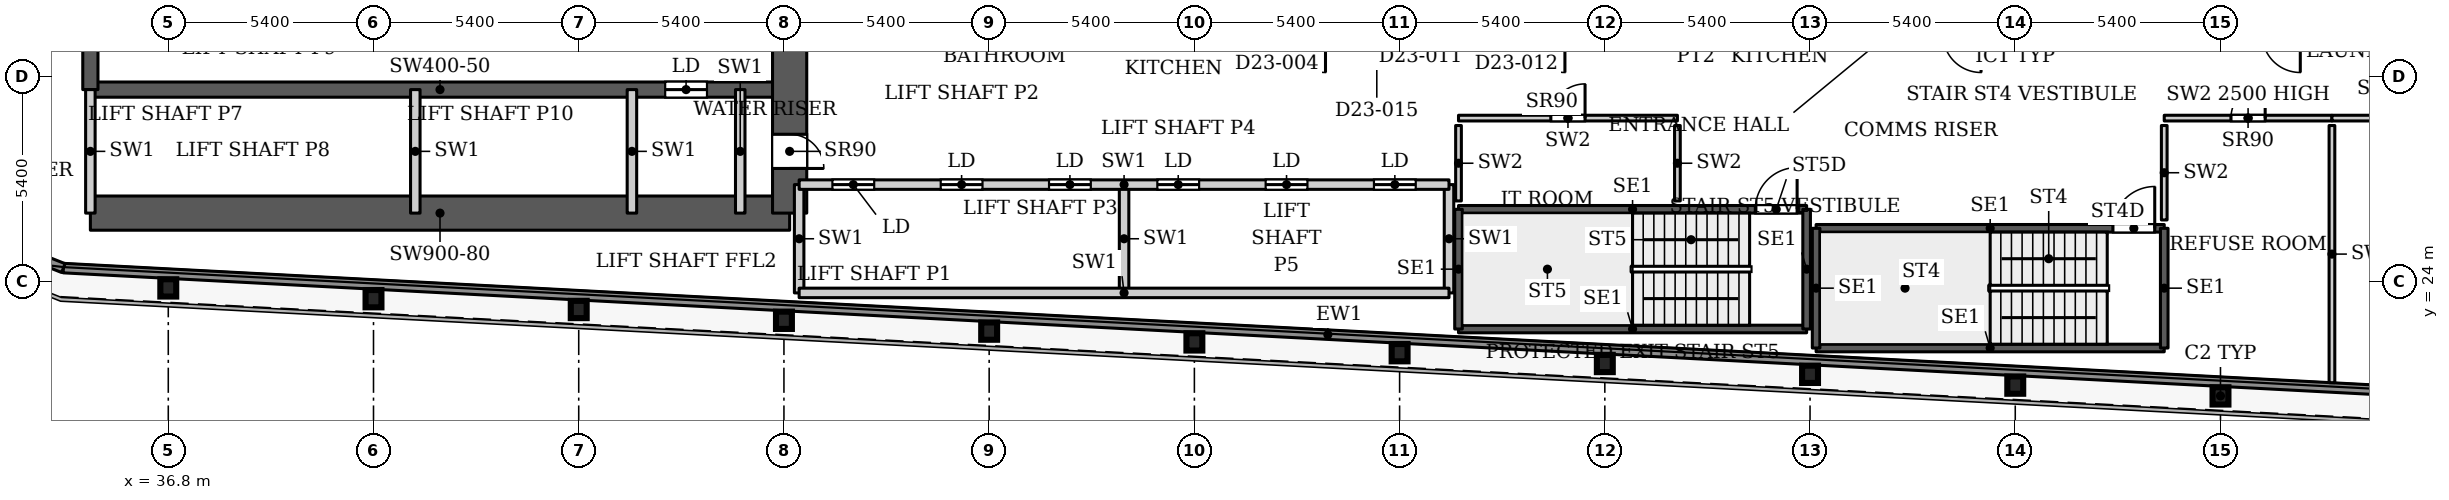
"""IFC4 building model, lengths in metres.
Left out: names, types, materials, properties, quantities, classifications, styles, units other than length and angle.
Written with IfcOpenShell. Run it as: python <this file> out.ifc"""

import sys

from ifc_helpers import new_model, si_unit, direction, frame, frame_2d, origin, origin_2d, place, context, subcontext, project, spatial, rectangle, i_section, extrude, source, transform, mapped, element, fill, save


model = new_model("IFC4")
c1 = context("Model", 3, precision=1e-05, world=origin(), true_north=direction((0.0, 1.0)))
c2 = subcontext(c1, "Body", "Model", "MODEL_VIEW")
j1 = project(units=[si_unit("LENGTHUNIT", "METRE"), si_unit("PLANEANGLEUNIT", "RADIAN")], contexts=[c1])
p1 = place(None, origin())
s1 = spatial("IfcSite", under=j1, at=p1, CompositionType="ELEMENT")
p2 = place(p1, origin())
s2 = spatial("IfcBuilding", under=s1, at=p2, CompositionType="ELEMENT")
p3 = place(p2, frame((0.0, 0.0, 105.8)))
s3 = spatial("IfcBuildingStorey", under=s2, at=p3, CompositionType="ELEMENT", Elevation=105.8)
for number, where, z_axis, x_axis in (
    (1, (90.8, 20.99, 0.0), (0.0, 0.0, 1.0), (1.0, 0.0, 0.0)),
    (2, (85.4, 21.274, 0.0), (0.0, 0.0, 1.0), (1.0, 0.0, 0.0)),
    (3, (80.0, 21.558, 0.0), (0.0, 0.0, 1.0), (1.0, 0.0, 0.0)),
    (4, (74.6, 21.843, 0.0), (0.0, 0.0, 1.0), (1.0, 0.0, 0.0)),
    (5, (69.2, 22.127, 0.0), (0.0, 0.0, 1.0), (1.0, 0.0, 0.0)),
    (6, (63.8, 22.411, 0.0), (0.0, 0.0, 1.0), (1.0, 0.0, 0.0)),
    (7, (58.4, 22.695, 0.0), (0.0, 0.0, 1.0), (1.0, 0.0, 0.0)),
    (8, (53.0, 22.98, 0.0), (0.0, 0.0, 1.0), (1.0, 0.0, 0.0)),
    (9, (47.6, 23.264, 0.0), (0.0, 0.0, 1.0), (1.0, 0.0, 0.0)),
    (10, (42.2, 23.548, 0.0), (0.0, 0.0, 1.0), (1.0, 0.0, 0.0)),
    (11, (36.8, 23.832, 0.0), (0.0, 0.0, 1.0), (1.0, 0.0, 0.0)),
):
    element("IfcColumn", number, at=place(p3, frame(where, z_axis=z_axis, x_axis=x_axis)), inside=s3, PredefinedType="COLUMN", context=c2, shape_type="SweptSolid", body=[
        extrude(i_section(OverallWidth=0.418, OverallDepth=0.455, WebThickness=0.042, FlangeThickness=0.068, FilletRadius=0.014, at=origin_2d()), origin(), (0.0, 0.0, 1.0), 3.9),
    ])
p4 = place(p3, frame((34.75, 25.8, 0.0), z_axis=(0.0, 0.0, 1.0), x_axis=(1.0, 0.0, 0.0)))
e12 = element("IfcWall", 12, at=p4, inside=s3, PredefinedType="SHEAR", context=c2, shape_type="SweptSolid", body=[
    extrude(rectangle(XDim=18.4, YDim=0.9, at=frame_2d((9.2, 0.0))), origin(), (0.0, 0.0, 1.0), 3.9),
])
p5 = place(p3, frame((34.75, 29.05, 0.0), z_axis=(0.0, 0.0, 1.0), x_axis=(1.0, 0.0, 0.0)))
e13 = element("IfcWall", 13, at=p5, inside=s3, PredefinedType="SHEAR", context=c2, shape_type="SweptSolid", body=[
    extrude(rectangle(XDim=18.4, YDim=0.4, at=frame_2d((9.2, 0.0))), origin(), (0.0, 0.0, 1.0), 3.9),
])
p6 = place(p5, frame((15.125, 0.0, 0.0)))
e14 = element("IfcOpeningElement", 14, at=p6, cuts=e13, PredefinedType="OPENING", context=c2, shape_type="SweptSolid", body=[
    extrude(rectangle(XDim=1.1, YDim=2.2, at=frame_2d((0.55, 1.1))), frame((0.0, 0.21, 0.0), z_axis=(0.0, -1.0, 0.0), x_axis=(1.0, 0.0, 0.0)), (0.0, 0.0, 1.0), 0.42),
])
p7 = place(p3, frame((34.75, 29.05, 0.0), z_axis=(0.0, 0.0, 1.0), x_axis=(0.0, 1.0, 0.0)))
e15 = element("IfcWall", 15, at=p7, inside=s3, PredefinedType="SHEAR", context=c2, shape_type="SweptSolid", body=[
    extrude(rectangle(XDim=18.45, YDim=0.4, at=frame_2d((9.225, 0.0))), origin(), (0.0, 0.0, 1.0), 3.9),
])
p8 = place(p7, frame((8.025, 0.0, 0.0)))
e16 = element("IfcOpeningElement", 16, at=p8, cuts=e15, PredefinedType="OPENING", context=c2, shape_type="SweptSolid", body=[
    extrude(rectangle(XDim=1.1, YDim=2.2, at=frame_2d((0.55, 1.1))), frame((0.0, 0.21, 0.0), z_axis=(0.0, -1.0, 0.0), x_axis=(1.0, 0.0, 0.0)), (0.0, 0.0, 1.0), 0.42),
])
p9 = place(p7, frame((10.875, 0.0, 0.0)))
e17 = element("IfcOpeningElement", 17, at=p9, cuts=e15, PredefinedType="OPENING", context=c2, shape_type="SweptSolid", body=[
    extrude(rectangle(XDim=1.1, YDim=2.2, at=frame_2d((0.55, 1.1))), frame((0.0, 0.21, 0.0), z_axis=(0.0, -1.0, 0.0), x_axis=(1.0, 0.0, 0.0)), (0.0, 0.0, 1.0), 0.42),
])
p10 = place(p7, frame((13.725, 0.0, 0.0)))
e18 = element("IfcOpeningElement", 18, at=p10, cuts=e15, PredefinedType="OPENING", context=c2, shape_type="SweptSolid", body=[
    extrude(rectangle(XDim=1.1, YDim=2.2, at=frame_2d((0.55, 1.1))), frame((0.0, 0.21, 0.0), z_axis=(0.0, -1.0, 0.0), x_axis=(1.0, 0.0, 0.0)), (0.0, 0.0, 1.0), 0.42),
])
p11 = place(p7, frame((15.95, 0.0, 0.0)))
e19 = element("IfcOpeningElement", 19, at=p11, cuts=e15, PredefinedType="OPENING", context=c2, shape_type="SweptSolid", body=[
    extrude(rectangle(XDim=1.1, YDim=2.2, at=frame_2d((0.55, 1.1))), frame((0.0, 0.21, 0.0), z_axis=(0.0, -1.0, 0.0), x_axis=(1.0, 0.0, 0.0)), (0.0, 0.0, 1.0), 0.42),
])
p12 = place(p3, frame((53.15, 25.8, 0.0), z_axis=(0.0, 0.0, 1.0), x_axis=(0.0, 1.0, 0.0)))
e20 = element("IfcWall", 20, at=p12, inside=s3, PredefinedType="SHEAR", context=c2, shape_type="SweptSolid", body=[
    extrude(rectangle(XDim=10.4, YDim=0.9, at=frame_2d((5.2, 0.0))), origin(), (0.0, 0.0, 1.0), 3.9),
])
p13 = place(p12, frame((1.175, 0.0, 0.0)))
e21 = element("IfcOpeningElement", 21, at=p13, cuts=e20, PredefinedType="OPENING", context=c2, shape_type="SweptSolid", body=[
    extrude(rectangle(XDim=0.9, YDim=2.2, at=frame_2d((0.45, 1.1))), frame((0.0, 0.46, 0.0), z_axis=(0.0, -1.0, 0.0), x_axis=(1.0, 0.0, 0.0)), (0.0, 0.0, 1.0), 0.92),
])
p14 = place(p3, frame((100.586, 20.85, 0.0), z_axis=(0.0, 0.0, 1.0), x_axis=(-0.99861746497, 0.052565755559, 0.0)))
e22 = element("IfcWall", 22, at=p14, inside=s3, PredefinedType="SOLIDWALL", context=c2, shape_type="SweptSolid", body=[
    extrude(rectangle(XDim=66.639, YDim=0.25, at=frame_2d((33.319, 0.0))), origin(), (0.0, 0.0, 1.0), 3.75),
])
p15 = place(p3, frame((34.039, 24.353, 0.0), z_axis=(0.0, 0.0, 1.0), x_axis=(-0.929352825399, 0.369192803184, 0.0)))
e23 = element("IfcWall", 23, at=p15, inside=s3, PredefinedType="SOLIDWALL", context=c2, shape_type="SweptSolid", body=[
    extrude(rectangle(XDim=4.656, YDim=0.25, at=frame_2d((2.328, 0.0))), origin(), (0.0, 0.0, 1.0), 3.75),
])
p16 = place(p3, frame((80.16, 22.25, 0.0), z_axis=(0.0, 0.0, 1.0), x_axis=(1.0, 0.0, 0.0)))
e24 = element("IfcWall", 24, at=p16, inside=s3, PredefinedType="SHEAR", context=c2, shape_type="SweptSolid", body=[
    extrude(rectangle(XDim=9.16, YDim=0.2, at=frame_2d((4.58, 0.0))), origin(), (0.0, 0.0, 1.0), 3.9),
])
p17 = place(p3, frame((80.16, 25.4, 0.0), z_axis=(0.0, 0.0, 1.0), x_axis=(1.0, 0.0, 0.0)))
e25 = element("IfcWall", 25, at=p17, inside=s3, PredefinedType="SHEAR", context=c2, shape_type="SweptSolid", body=[
    extrude(rectangle(XDim=9.16, YDim=0.2, at=frame_2d((4.58, 0.0))), origin(), (0.0, 0.0, 1.0), 3.9),
])
p18 = place(p17, frame((7.81, 0.0, 0.0)))
e26 = element("IfcOpeningElement", 26, at=p18, cuts=e25, PredefinedType="OPENING", context=c2, shape_type="SweptSolid", body=[
    extrude(rectangle(XDim=1.1, YDim=2.2, at=frame_2d((0.55, 1.1))), frame((0.0, 0.11, 0.0), z_axis=(0.0, -1.0, 0.0), x_axis=(1.0, 0.0, 0.0)), (0.0, 0.0, 1.0), 0.22),
])
for number, where, z_axis, x_axis in (
    (27, (80.16, 22.25, 0.0), (0.0, 0.0, 1.0), (0.0, 1.0, 0.0)),
    (28, (89.32, 22.25, 0.0), (0.0, 0.0, 1.0), (0.0, 1.0, 0.0)),
):
    element("IfcWall", number, at=place(p3, frame(where, z_axis=z_axis, x_axis=x_axis)), inside=s3, PredefinedType="SHEAR", context=c2, shape_type="SweptSolid", body=[
        extrude(rectangle(XDim=3.15, YDim=0.2, at=frame_2d((1.575, 0.0))), origin(), (0.0, 0.0, 1.0), 3.9),
    ])
p19 = place(p3, frame((70.75, 22.75, 0.0), z_axis=(0.0, 0.0, 1.0), x_axis=(1.0, 0.0, 0.0)))
e29 = element("IfcWall", 29, at=p19, inside=s3, PredefinedType="SHEAR", context=c2, shape_type="SweptSolid", body=[
    extrude(rectangle(XDim=9.16, YDim=0.2, at=frame_2d((4.58, 0.0))), origin(), (0.0, 0.0, 1.0), 3.9),
])
p20 = place(p3, frame((70.75, 25.9, 0.0), z_axis=(0.0, 0.0, 1.0), x_axis=(1.0, 0.0, 0.0)))
e30 = element("IfcWall", 30, at=p20, inside=s3, PredefinedType="SHEAR", context=c2, shape_type="SweptSolid", body=[
    extrude(rectangle(XDim=9.16, YDim=0.2, at=frame_2d((4.58, 0.0))), origin(), (0.0, 0.0, 1.0), 3.9),
])
p21 = place(p20, frame((7.81, 0.0, 0.0)))
e31 = element("IfcOpeningElement", 31, at=p21, cuts=e30, PredefinedType="OPENING", context=c2, shape_type="SweptSolid", body=[
    extrude(rectangle(XDim=1.1, YDim=2.2, at=frame_2d((0.55, 1.1))), frame((0.0, 0.11, 0.0), z_axis=(0.0, -1.0, 0.0), x_axis=(1.0, 0.0, 0.0)), (0.0, 0.0, 1.0), 0.22),
])
for number, where, z_axis, x_axis in (
    (32, (70.75, 22.75, 0.0), (0.0, 0.0, 1.0), (0.0, 1.0, 0.0)),
    (33, (79.91, 22.75, 0.0), (0.0, 0.0, 1.0), (0.0, 1.0, 0.0)),
):
    element("IfcWall", number, at=place(p3, frame(where, z_axis=z_axis, x_axis=x_axis)), inside=s3, PredefinedType="SHEAR", context=c2, shape_type="SweptSolid", body=[
        extrude(rectangle(XDim=3.15, YDim=0.2, at=frame_2d((1.575, 0.0))), origin(), (0.0, 0.0, 1.0), 3.9),
    ])
for number, where, z_axis, x_axis in (
    (34, (34.75, 25.8, 0.0), (0.0, 0.0, 1.0), (0.0, 1.0, 0.0)),
    (35, (43.3, 25.8, 0.0), (0.0, 0.0, 1.0), (0.0, 1.0, 0.0)),
    (36, (49.0, 25.8, 0.0), (0.0, 0.0, 1.0), (0.0, 1.0, 0.0)),
    (37, (51.85, 25.8, 0.0), (0.0, 0.0, 1.0), (0.0, 1.0, 0.0)),
):
    element("IfcWall", number, at=place(p3, frame(where, z_axis=z_axis, x_axis=x_axis)), inside=s3, PredefinedType="PARTITIONING", context=c2, shape_type="SweptSolid", body=[
        extrude(rectangle(XDim=3.25, YDim=0.25, at=frame_2d((1.625, 0.0))), origin(), (0.0, 0.0, 1.0), 3.9),
    ])
for number, where, z_axis, x_axis in (
    (38, (53.4, 23.7, 0.0), (0.0, 0.0, 1.0), (0.0, 1.0, 0.0)),
    (39, (61.95, 23.7, 0.0), (0.0, 0.0, 1.0), (0.0, 1.0, 0.0)),
    (40, (70.5, 23.7, 0.0), (0.0, 0.0, 1.0), (0.0, 1.0, 0.0)),
):
    element("IfcWall", number, at=place(p3, frame(where, z_axis=z_axis, x_axis=x_axis)), inside=s3, PredefinedType="PARTITIONING", context=c2, shape_type="SweptSolid", body=[
        extrude(rectangle(XDim=2.85, YDim=0.25, at=frame_2d((1.425, 0.0))), origin(), (0.0, 0.0, 1.0), 3.9),
    ])
p22 = place(p3, frame((53.4, 23.7, 0.0), z_axis=(0.0, 0.0, 1.0), x_axis=(1.0, 0.0, 0.0)))
e41 = element("IfcWall", 41, at=p22, inside=s3, PredefinedType="PARTITIONING", context=c2, shape_type="SweptSolid", body=[
    extrude(rectangle(XDim=17.1, YDim=0.25, at=frame_2d((8.55, 0.0))), origin(), (0.0, 0.0, 1.0), 3.9),
])
p23 = place(p3, frame((53.4, 26.55, 0.0), z_axis=(0.0, 0.0, 1.0), x_axis=(1.0, 0.0, 0.0)))
e42 = element("IfcWall", 42, at=p23, inside=s3, PredefinedType="PARTITIONING", context=c2, shape_type="SweptSolid", body=[
    extrude(rectangle(XDim=17.1, YDim=0.25, at=frame_2d((8.55, 0.0))), origin(), (0.0, 0.0, 1.0), 3.9),
])
p24 = place(p23, frame((0.875, 0.0, 0.0)))
e43 = element("IfcOpeningElement", 43, at=p24, cuts=e42, PredefinedType="OPENING", context=c2, shape_type="SweptSolid", body=[
    extrude(rectangle(XDim=1.1, YDim=2.2, at=frame_2d((0.55, 1.1))), frame((0.0, 0.135, 0.0), z_axis=(0.0, -1.0, 0.0), x_axis=(1.0, 0.0, 0.0)), (0.0, 0.0, 1.0), 0.27),
])
p25 = place(p23, frame((3.725, 0.0, 0.0)))
e44 = element("IfcOpeningElement", 44, at=p25, cuts=e42, PredefinedType="OPENING", context=c2, shape_type="SweptSolid", body=[
    extrude(rectangle(XDim=1.1, YDim=2.2, at=frame_2d((0.55, 1.1))), frame((0.0, 0.135, 0.0), z_axis=(0.0, -1.0, 0.0), x_axis=(1.0, 0.0, 0.0)), (0.0, 0.0, 1.0), 0.27),
])
p26 = place(p23, frame((6.575, 0.0, 0.0)))
e45 = element("IfcOpeningElement", 45, at=p26, cuts=e42, PredefinedType="OPENING", context=c2, shape_type="SweptSolid", body=[
    extrude(rectangle(XDim=1.1, YDim=2.2, at=frame_2d((0.55, 1.1))), frame((0.0, 0.135, 0.0), z_axis=(0.0, -1.0, 0.0), x_axis=(1.0, 0.0, 0.0)), (0.0, 0.0, 1.0), 0.27),
])
p27 = place(p23, frame((9.425, 0.0, 0.0)))
e46 = element("IfcOpeningElement", 46, at=p27, cuts=e42, PredefinedType="OPENING", context=c2, shape_type="SweptSolid", body=[
    extrude(rectangle(XDim=1.1, YDim=2.2, at=frame_2d((0.55, 1.1))), frame((0.0, 0.135, 0.0), z_axis=(0.0, -1.0, 0.0), x_axis=(1.0, 0.0, 0.0)), (0.0, 0.0, 1.0), 0.27),
])
p28 = place(p23, frame((12.275, 0.0, 0.0)))
e47 = element("IfcOpeningElement", 47, at=p28, cuts=e42, PredefinedType="OPENING", context=c2, shape_type="SweptSolid", body=[
    extrude(rectangle(XDim=1.1, YDim=2.2, at=frame_2d((0.55, 1.1))), frame((0.0, 0.135, 0.0), z_axis=(0.0, -1.0, 0.0), x_axis=(1.0, 0.0, 0.0)), (0.0, 0.0, 1.0), 0.27),
])
p29 = place(p23, frame((15.125, 0.0, 0.0)))
e48 = element("IfcOpeningElement", 48, at=p29, cuts=e42, PredefinedType="OPENING", context=c2, shape_type="SweptSolid", body=[
    extrude(rectangle(XDim=1.1, YDim=2.2, at=frame_2d((0.55, 1.1))), frame((0.0, 0.135, 0.0), z_axis=(0.0, -1.0, 0.0), x_axis=(1.0, 0.0, 0.0)), (0.0, 0.0, 1.0), 0.27),
])
p30 = place(p3, frame((70.75, 28.3, 0.0), z_axis=(0.0, 0.0, 1.0), x_axis=(1.0, 0.0, 0.0)))
e49 = element("IfcWall", 49, at=p30, inside=s3, PredefinedType="PARTITIONING", context=c2, shape_type="SweptSolid", body=[
    extrude(rectangle(XDim=5.76, YDim=0.15, at=frame_2d((2.88, 0.0))), origin(), (0.0, 0.0, 1.0), 3.9),
])
p31 = place(p30, frame((2.43, 0.0, 0.0)))
e50 = element("IfcOpeningElement", 50, at=p31, cuts=e49, PredefinedType="OPENING", context=c2, shape_type="SweptSolid", body=[
    extrude(rectangle(XDim=0.9, YDim=2.2, at=frame_2d((0.45, 1.1))), frame((0.0, 0.085, 0.0), z_axis=(0.0, -1.0, 0.0), x_axis=(1.0, 0.0, 0.0)), (0.0, 0.0, 1.0), 0.17),
])
for number, where, z_axis, x_axis in (
    (51, (70.75, 26.12, 0.0), (0.0, 0.0, 1.0), (0.0, 1.0, 0.0)),
    (52, (76.51, 26.12, 0.0), (0.0, 0.0, 1.0), (0.0, 1.0, 0.0)),
):
    element("IfcWall", number, at=place(p3, frame(where, z_axis=z_axis, x_axis=x_axis)), inside=s3, PredefinedType="PARTITIONING", context=c2, shape_type="SweptSolid", body=[
        extrude(rectangle(XDim=1.985, YDim=0.15, at=frame_2d((0.992, 0.0))), origin(), (0.0, 0.0, 1.0), 3.9),
    ])
p32 = place(p3, frame((89.32, 28.3, 0.0), z_axis=(0.0, 0.0, 1.0), x_axis=(1.0, 0.0, 0.0)))
e53 = element("IfcWall", 53, at=p32, inside=s3, PredefinedType="PARTITIONING", context=c2, shape_type="SweptSolid", body=[
    extrude(rectangle(XDim=4.413, YDim=0.15, at=frame_2d((2.207, 0.0))), origin(), (0.0, 0.0, 1.0), 2.5),
])
p33 = place(p32, frame((1.756, 0.0, 0.0)))
e54 = element("IfcOpeningElement", 54, at=p33, cuts=e53, PredefinedType="OPENING", context=c2, shape_type="SweptSolid", body=[
    extrude(rectangle(XDim=0.9, YDim=2.2, at=frame_2d((0.45, 1.1))), frame((0.0, 0.085, 0.0), z_axis=(0.0, -1.0, 0.0), x_axis=(1.0, 0.0, 0.0)), (0.0, 0.0, 1.0), 0.17),
])
p34 = place(p3, frame((89.32, 25.62, 0.0), z_axis=(0.0, 0.0, 1.0), x_axis=(0.0, 1.0, 0.0)))
e55 = element("IfcWall", 55, at=p34, inside=s3, PredefinedType="PARTITIONING", context=c2, shape_type="SweptSolid", body=[
    extrude(rectangle(XDim=2.485, YDim=0.15, at=frame_2d((1.242, 0.0))), origin(), (0.0, 0.0, 1.0), 3.9),
])
p35 = place(p3, frame((93.733, 21.338, 0.0), z_axis=(0.0, 0.0, 1.0), x_axis=(0.0, 1.0, 0.0)))
e56 = element("IfcWall", 56, at=p35, inside=s3, PredefinedType="PARTITIONING", context=c2, shape_type="SweptSolid", body=[
    extrude(rectangle(XDim=6.767, YDim=0.15, at=frame_2d((3.384, 0.0))), origin(), (0.0, 0.0, 1.0), 3.9),
])
p36 = place(p3, frame((93.733, 28.3, 0.0), z_axis=(0.0, 0.0, 1.0), x_axis=(1.0, 0.0, 0.0)))
e57 = element("IfcWall", 57, at=p36, inside=s3, PredefinedType="PARTITIONING", context=c2, shape_type="SweptSolid", body=[
    extrude(rectangle(XDim=6.165, YDim=0.15, at=frame_2d((3.083, 0.0))), origin(), (0.0, 0.0, 1.0), 3.9),
])
p37 = place(p36, frame((1.683, 0.0, 0.0)))
e58 = element("IfcOpeningElement", 58, at=p37, cuts=e57, PredefinedType="OPENING", context=c2, shape_type="SweptSolid", body=[
    extrude(rectangle(XDim=0.9, YDim=2.2, at=frame_2d((0.45, 1.1))), frame((0.0, 0.085, 0.0), z_axis=(0.0, -1.0, 0.0), x_axis=(1.0, 0.0, 0.0)), (0.0, 0.0, 1.0), 0.17),
])
m1 = source(origin(), c2, "Body", "SweptSolid", [
    extrude(rectangle(XDim=1.1, YDim=2.2, at=frame_2d((0.55, 1.1))), frame((0.0, 0.025, 0.0), z_axis=(0.0, -1.0, 0.0), x_axis=(1.0, 0.0, 0.0)), (0.0, 0.0, 1.0), 0.05),
])
p38 = place(p24, origin())
e59 = element("IfcDoor", 59, at=p38, inside=s3, OperationType="SLIDING_TO_LEFT", PredefinedType="DOOR", context=c2, shape_type="MappedRepresentation", body=[
    mapped(m1, transform((0.0, 0.0, 0.0), x_axis=(1.0, 0.0, 0.0), y_axis=(0.0, 1.0, 0.0), z_axis=(0.0, 0.0, 1.0), scale=1.0)),
])
fill(e43, e59)
p39 = place(p25, origin())
e60 = element("IfcDoor", 60, at=p39, inside=s3, OperationType="SLIDING_TO_LEFT", PredefinedType="DOOR", context=c2, shape_type="MappedRepresentation", body=[
    mapped(m1, transform((0.0, 0.0, 0.0), x_axis=(1.0, 0.0, 0.0), y_axis=(0.0, 1.0, 0.0), z_axis=(0.0, 0.0, 1.0), scale=1.0)),
])
fill(e44, e60)
p40 = place(p26, origin())
e61 = element("IfcDoor", 61, at=p40, inside=s3, OperationType="SLIDING_TO_LEFT", PredefinedType="DOOR", context=c2, shape_type="MappedRepresentation", body=[
    mapped(m1, transform((0.0, 0.0, 0.0), x_axis=(1.0, 0.0, 0.0), y_axis=(0.0, 1.0, 0.0), z_axis=(0.0, 0.0, 1.0), scale=1.0)),
])
fill(e45, e61)
p41 = place(p27, origin())
e62 = element("IfcDoor", 62, at=p41, inside=s3, OperationType="SLIDING_TO_LEFT", PredefinedType="DOOR", context=c2, shape_type="MappedRepresentation", body=[
    mapped(m1, transform((0.0, 0.0, 0.0), x_axis=(1.0, 0.0, 0.0), y_axis=(0.0, 1.0, 0.0), z_axis=(0.0, 0.0, 1.0), scale=1.0)),
])
fill(e46, e62)
p42 = place(p28, origin())
e63 = element("IfcDoor", 63, at=p42, inside=s3, OperationType="SLIDING_TO_LEFT", PredefinedType="DOOR", context=c2, shape_type="MappedRepresentation", body=[
    mapped(m1, transform((0.0, 0.0, 0.0), x_axis=(1.0, 0.0, 0.0), y_axis=(0.0, 1.0, 0.0), z_axis=(0.0, 0.0, 1.0), scale=1.0)),
])
fill(e47, e63)
p43 = place(p29, origin())
e64 = element("IfcDoor", 64, at=p43, inside=s3, OperationType="SLIDING_TO_LEFT", PredefinedType="DOOR", context=c2, shape_type="MappedRepresentation", body=[
    mapped(m1, transform((0.0, 0.0, 0.0), x_axis=(1.0, 0.0, 0.0), y_axis=(0.0, 1.0, 0.0), z_axis=(0.0, 0.0, 1.0), scale=1.0)),
])
fill(e48, e64)
p44 = place(p6, origin())
e65 = element("IfcDoor", 65, at=p44, inside=s3, OperationType="SLIDING_TO_LEFT", PredefinedType="DOOR", context=c2, shape_type="MappedRepresentation", body=[
    mapped(m1, transform((0.0, 0.0, 0.0), x_axis=(1.0, 0.0, 0.0), y_axis=(0.0, 1.0, 0.0), z_axis=(0.0, 0.0, 1.0), scale=1.0)),
])
fill(e14, e65)
m2 = source(origin(), c2, "Body", "SweptSolid", [
    extrude(rectangle(XDim=0.9, YDim=2.2, at=frame_2d((0.45, 1.1))), frame((0.0, 0.025, 0.0), z_axis=(0.0, -1.0, 0.0), x_axis=(1.0, 0.0, 0.0)), (0.0, 0.0, 1.0), 0.05),
])
p45 = place(p13, origin())
e66 = element("IfcDoor", 66, at=p45, inside=s3, OperationType="SINGLE_SWING_RIGHT", PredefinedType="DOOR", context=c2, shape_type="MappedRepresentation", body=[
    mapped(m2, transform((0.0, 0.0, 0.0), x_axis=(1.0, 0.0, 0.0), y_axis=(0.0, 1.0, 0.0), z_axis=(0.0, 0.0, 1.0), scale=1.0)),
])
fill(e21, e66)
p46 = place(p31, origin())
e67 = element("IfcDoor", 67, at=p46, inside=s3, OperationType="SINGLE_SWING_LEFT", PredefinedType="DOOR", context=c2, shape_type="MappedRepresentation", body=[
    mapped(m2, transform((0.0, 0.0, 0.0), x_axis=(1.0, 0.0, 0.0), y_axis=(0.0, 1.0, 0.0), z_axis=(0.0, 0.0, 1.0), scale=1.0)),
])
fill(e50, e67)
p47 = place(p33, origin())
e68 = element("IfcDoor", 68, at=p47, inside=s3, OperationType="SINGLE_SWING_LEFT", PredefinedType="DOOR", context=c2, shape_type="MappedRepresentation", body=[
    mapped(m2, transform((0.0, 0.0, 0.0), x_axis=(1.0, 0.0, 0.0), y_axis=(0.0, 1.0, 0.0), z_axis=(0.0, 0.0, 1.0), scale=1.0)),
])
fill(e54, e68)
m3 = source(origin(), c2, "Body", "SweptSolid", [
    extrude(rectangle(XDim=1.1, YDim=2.2, at=frame_2d((0.55, 1.1))), frame((0.0, 0.025, 0.0), z_axis=(0.0, -1.0, 0.0), x_axis=(1.0, 0.0, 0.0)), (0.0, 0.0, 1.0), 0.05),
])
p48 = place(p18, origin())
e69 = element("IfcDoor", 69, at=p48, inside=s3, OperationType="SINGLE_SWING_LEFT", PredefinedType="DOOR", context=c2, shape_type="MappedRepresentation", body=[
    mapped(m3, transform((0.0, 0.0, 0.0), x_axis=(1.0, 0.0, 0.0), y_axis=(0.0, 1.0, 0.0), z_axis=(0.0, 0.0, 1.0), scale=1.0)),
])
fill(e26, e69)
p49 = place(p21, origin())
e70 = element("IfcDoor", 70, at=p49, inside=s3, OperationType="SINGLE_SWING_LEFT", PredefinedType="DOOR", context=c2, shape_type="MappedRepresentation", body=[
    mapped(m3, transform((0.0, 0.0, 0.0), x_axis=(1.0, 0.0, 0.0), y_axis=(0.0, 1.0, 0.0), z_axis=(0.0, 0.0, 1.0), scale=1.0)),
])
fill(e31, e70)
save(model, sys.argv[1])
